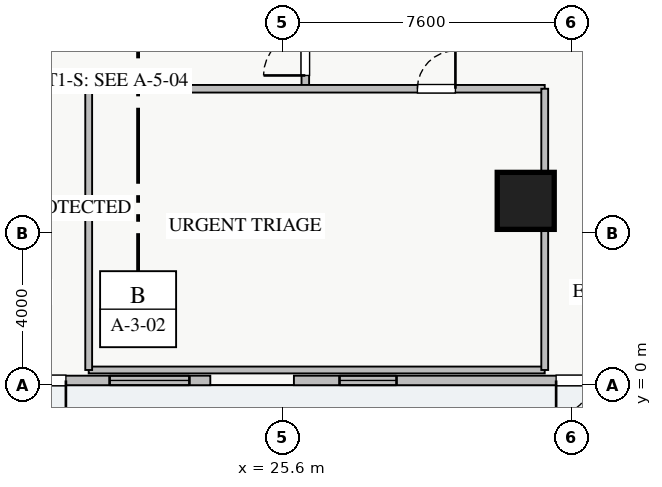
"""IFC4 building model, lengths in metres.
Left out: names, types, materials, properties, quantities, classifications, styles, units other than length and angle.
Written with IfcOpenShell. Run it as: python <this file> out.ifc"""

import sys

from ifc_helpers import new_model, si_unit, direction, frame, frame_2d, origin, origin_2d, place, context, subcontext, project, spatial, rectangle, extrude, source, transform, mapped, element, fill, save


model = new_model("IFC4")
c1 = context("Model", 3, precision=1e-05, world=origin(), true_north=direction((0.0, 1.0)))
c2 = subcontext(c1, "Body", "Model", "MODEL_VIEW")
j1 = project(units=[si_unit("LENGTHUNIT", "METRE"), si_unit("PLANEANGLEUNIT", "RADIAN")], contexts=[c1])
p1 = place(None, origin())
s1 = spatial("IfcSite", under=j1, at=p1, CompositionType="ELEMENT")
p2 = place(p1, origin())
s2 = spatial("IfcBuilding", under=s1, at=p2, CompositionType="ELEMENT")
p3 = place(p2, origin())
s3 = spatial("IfcBuildingStorey", under=s2, at=p3, CompositionType="ELEMENT", Elevation=0.0)
m1 = source(origin(), c2, "Body", "SweptSolid", [
    extrude(rectangle(XDim=1.5, YDim=1.5, at=origin_2d()), origin(), (0.0, 0.0, 1.0), 5.0),
])
p4 = place(p3, frame((32.0, 4.85, 0.0), z_axis=(0.0, 0.0, 1.0), x_axis=(1.0, 0.0, 0.0)))
e1 = element("IfcColumn", 1, at=p4, inside=s3, PredefinedType="COLUMN", context=c2, shape_type="MappedRepresentation", body=[
    mapped(m1, transform((0.0, 0.0, 0.0), x_axis=(1.0, 0.0, 0.0), y_axis=(0.0, 1.0, 0.0), z_axis=(0.0, 0.0, 1.0), scale=1.0)),
])
p5 = place(p3, frame((14.3, 0.125, 0.0), z_axis=(0.0, 0.0, 1.0), x_axis=(1.0, 0.0, 0.0)))
e2 = element("IfcWall", 2, at=p5, inside=s3, PredefinedType="STANDARD", context=c2, shape_type="SweptSolid", body=[
    extrude(rectangle(XDim=9.4, YDim=0.25, at=frame_2d((4.7, 0.0))), origin(), (0.0, 0.0, 1.0), 4.32),
])
p6 = place(p5, frame((3.8, 0.0, 0.0)))
e3 = element("IfcOpeningElement", 3, at=p6, cuts=e2, PredefinedType="OPENING", context=c2, shape_type="SweptSolid", body=[
    extrude(rectangle(XDim=1.8, YDim=2.2, at=frame_2d((0.9, 1.1))), frame((0.0, 0.135, 0.0), z_axis=(0.0, -1.0, 0.0), x_axis=(1.0, 0.0, 0.0)), (0.0, 0.0, 1.0), 0.27),
])
p7 = place(p5, frame((1.6, 0.0, 0.9)))
e4 = element("IfcOpeningElement", 4, at=p7, cuts=e2, PredefinedType="OPENING", context=c2, shape_type="SweptSolid", body=[
    extrude(rectangle(XDim=1.5, YDim=1.45, at=frame_2d((0.75, 0.725))), frame((0.0, 0.135, 0.0), z_axis=(0.0, -1.0, 0.0), x_axis=(1.0, 0.0, 0.0)), (0.0, 0.0, 1.0), 0.27),
])
p8 = place(p5, frame((6.75, 0.0, 0.9)))
e5 = element("IfcOpeningElement", 5, at=p8, cuts=e2, PredefinedType="OPENING", context=c2, shape_type="SweptSolid", body=[
    extrude(rectangle(XDim=2.1, YDim=1.5, at=frame_2d((1.05, 0.75))), frame((0.0, 0.135, 0.0), z_axis=(0.0, -1.0, 0.0), x_axis=(1.0, 0.0, 0.0)), (0.0, 0.0, 1.0), 0.27),
])
p9 = place(p3, frame((25.9, 0.125, 0.0), z_axis=(0.0, 0.0, 1.0), x_axis=(1.0, 0.0, 0.0)))
e6 = element("IfcWall", 6, at=p9, inside=s3, PredefinedType="STANDARD", context=c2, shape_type="SweptSolid", body=[
    extrude(rectangle(XDim=15.6, YDim=0.25, at=frame_2d((7.8, 0.0))), origin(), (0.0, 0.0, 1.0), 4.32),
])
p10 = place(p9, frame((6.9, 0.0, 0.0)))
e7 = element("IfcOpeningElement", 7, at=p10, cuts=e6, PredefinedType="OPENING", context=c2, shape_type="SweptSolid", body=[
    extrude(rectangle(XDim=1.8, YDim=2.2, at=frame_2d((0.9, 1.1))), frame((0.0, 0.135, 0.0), z_axis=(0.0, -1.0, 0.0), x_axis=(1.0, 0.0, 0.0)), (0.0, 0.0, 1.0), 0.27),
])
p11 = place(p9, frame((1.2, 0.0, 0.9)))
e8 = element("IfcOpeningElement", 8, at=p11, cuts=e6, PredefinedType="OPENING", context=c2, shape_type="SweptSolid", body=[
    extrude(rectangle(XDim=1.5, YDim=1.45, at=frame_2d((0.75, 0.725))), frame((0.0, 0.135, 0.0), z_axis=(0.0, -1.0, 0.0), x_axis=(1.0, 0.0, 0.0)), (0.0, 0.0, 1.0), 0.27),
])
p12 = place(p9, frame((12.75, 0.0, 0.9)))
e9 = element("IfcOpeningElement", 9, at=p12, cuts=e6, PredefinedType="OPENING", context=c2, shape_type="SweptSolid", body=[
    extrude(rectangle(XDim=1.8, YDim=1.45, at=frame_2d((0.9, 0.725))), frame((0.0, 0.135, 0.0), z_axis=(0.0, -1.0, 0.0), x_axis=(1.0, 0.0, 0.0)), (0.0, 0.0, 1.0), 0.27),
])
p13 = place(p3, frame((26.2, 7.8, 0.0), z_axis=(0.0, 0.0, 1.0), x_axis=(0.0, 1.0, 0.0)))
e10 = element("IfcWall", 10, at=p13, inside=s3, PredefinedType="PARTITIONING", context=c2, shape_type="SweptSolid", body=[
    extrude(rectangle(XDim=2.0, YDim=0.2, at=frame_2d((1.0, 0.0))), origin(), (0.0, 0.0, 1.0), 4.78),
])
p14 = place(p13, frame((0.35, 0.0, 0.0)))
e11 = element("IfcOpeningElement", 11, at=p14, cuts=e10, PredefinedType="OPENING", context=c2, shape_type="SweptSolid", body=[
    extrude(rectangle(XDim=1.1, YDim=2.05, at=frame_2d((0.55, 1.025))), frame((0.0, 0.11, 0.0), z_axis=(0.0, -1.0, 0.0), x_axis=(1.0, 0.0, 0.0)), (0.0, 0.0, 1.0), 0.22),
])
p15 = place(p3, frame((20.5, 7.8, 0.0), z_axis=(0.0, 0.0, 1.0), x_axis=(1.0, 0.0, 0.0)))
e12 = element("IfcWall", 12, at=p15, inside=s3, PredefinedType="PARTITIONING", context=c2, shape_type="SweptSolid", body=[
    extrude(rectangle(XDim=12.0, YDim=0.2, at=frame_2d((6.0, 0.0))), origin(), (0.0, 0.0, 1.0), 4.78),
])
p16 = place(p15, frame((8.65, 0.0, 0.0)))
e13 = element("IfcOpeningElement", 13, at=p16, cuts=e12, PredefinedType="OPENING", context=c2, shape_type="SweptSolid", body=[
    extrude(rectangle(XDim=1.0, YDim=2.05, at=frame_2d((0.5, 1.025))), frame((0.0, 0.11, 0.0), z_axis=(0.0, -1.0, 0.0), x_axis=(1.0, 0.0, 0.0)), (0.0, 0.0, 1.0), 0.22),
])
p17 = place(p3, frame((20.5, 0.4, 0.0), z_axis=(0.0, 0.0, 1.0), x_axis=(1.0, 0.0, 0.0)))
e14 = element("IfcWall", 14, at=p17, inside=s3, PredefinedType="PARTITIONING", context=c2, shape_type="SweptSolid", body=[
    extrude(rectangle(XDim=12.0, YDim=0.18, at=frame_2d((6.0, 0.0))), origin(), (0.0, 0.0, 1.0), 4.78),
])
for number, where, z_axis, x_axis in (
    (15, (20.5, 0.4, 0.0), (0.0, 0.0, 1.0), (0.0, 1.0, 0.0)),
    (16, (32.5, 0.4, 0.0), (0.0, 0.0, 1.0), (0.0, 1.0, 0.0)),
):
    element("IfcWall", number, at=place(p3, frame(where, z_axis=z_axis, x_axis=x_axis)), inside=s3, PredefinedType="PARTITIONING", context=c2, shape_type="SweptSolid", body=[
        extrude(rectangle(XDim=7.4, YDim=0.18, at=frame_2d((3.7, 0.0))), origin(), (0.0, 0.0, 1.0), 4.78),
    ])
m2 = source(origin(), c2, "Body", "SweptSolid", [
    extrude(rectangle(XDim=1.8, YDim=2.2, at=frame_2d((0.9, 1.1))), frame((0.0, 0.025, 0.0), z_axis=(0.0, -1.0, 0.0), x_axis=(1.0, 0.0, 0.0)), (0.0, 0.0, 1.0), 0.05),
])
p18 = place(p6, frame((1.8, 0.0, 0.0), z_axis=(0.0, 0.0, 1.0), x_axis=(-1.0, 0.0, 0.0)))
e17 = element("IfcDoor", 17, at=p18, inside=s3, OperationType="DOUBLE_DOOR_SINGLE_SWING", PredefinedType="DOOR", context=c2, shape_type="MappedRepresentation", body=[
    mapped(m2, transform((0.0, 0.0, 0.0), x_axis=(1.0, 0.0, 0.0), y_axis=(0.0, 1.0, 0.0), z_axis=(0.0, 0.0, 1.0), scale=1.0)),
])
fill(e3, e17)
m3 = source(origin(), c2, "Body", "SweptSolid", [
    extrude(rectangle(XDim=2.1, YDim=1.5, at=frame_2d((1.05, 0.75))), frame((0.0, 0.03, 0.0), z_axis=(0.0, -1.0, 0.0), x_axis=(1.0, 0.0, 0.0)), (0.0, 0.0, 1.0), 0.06),
])
p19 = place(p8, origin())
e18 = element("IfcWindow", 18, at=p19, inside=s3, PartitioningType="TRIPLE_PANEL_VERTICAL", PredefinedType="WINDOW", context=c2, shape_type="MappedRepresentation", body=[
    mapped(m3, transform((0.0, 0.0, 0.0), x_axis=(1.0, 0.0, 0.0), y_axis=(0.0, 1.0, 0.0), z_axis=(0.0, 0.0, 1.0), scale=1.0)),
])
fill(e5, e18)
p20 = place(p10, frame((1.8, 0.0, 0.0), z_axis=(0.0, 0.0, 1.0), x_axis=(-1.0, 0.0, 0.0)))
e19 = element("IfcDoor", 19, at=p20, inside=s3, OperationType="DOUBLE_DOOR_SINGLE_SWING", PredefinedType="DOOR", context=c2, shape_type="MappedRepresentation", body=[
    mapped(m2, transform((0.0, 0.0, 0.0), x_axis=(1.0, 0.0, 0.0), y_axis=(0.0, 1.0, 0.0), z_axis=(0.0, 0.0, 1.0), scale=1.0)),
])
fill(e7, e19)
m4 = source(origin(), c2, "Body", "SweptSolid", [
    extrude(rectangle(XDim=1.5, YDim=1.45, at=frame_2d((0.75, 0.725))), frame((0.0, 0.03, 0.0), z_axis=(0.0, -1.0, 0.0), x_axis=(1.0, 0.0, 0.0)), (0.0, 0.0, 1.0), 0.06),
])
p21 = place(p11, origin())
e20 = element("IfcWindow", 20, at=p21, inside=s3, PartitioningType="DOUBLE_PANEL_VERTICAL", PredefinedType="WINDOW", context=c2, shape_type="MappedRepresentation", body=[
    mapped(m4, transform((0.0, 0.0, 0.0), x_axis=(1.0, 0.0, 0.0), y_axis=(0.0, 1.0, 0.0), z_axis=(0.0, 0.0, 1.0), scale=1.0)),
])
fill(e8, e20)
m5 = source(origin(), c2, "Body", "SweptSolid", [
    extrude(rectangle(XDim=1.1, YDim=2.05, at=frame_2d((0.55, 1.025))), frame((0.0, 0.025, 0.0), z_axis=(0.0, -1.0, 0.0), x_axis=(1.0, 0.0, 0.0)), (0.0, 0.0, 1.0), 0.05),
])
p22 = place(p14, origin())
e21 = element("IfcDoor", 21, at=p22, inside=s3, OperationType="SINGLE_SWING_LEFT", PredefinedType="DOOR", context=c2, shape_type="MappedRepresentation", body=[
    mapped(m5, transform((0.0, 0.0, 0.0), x_axis=(1.0, 0.0, 0.0), y_axis=(0.0, 1.0, 0.0), z_axis=(0.0, 0.0, 1.0), scale=1.0)),
])
fill(e11, e21)
m6 = source(origin(), c2, "Body", "SweptSolid", [
    extrude(rectangle(XDim=1.0, YDim=2.05, at=frame_2d((0.5, 1.025))), frame((0.0, 0.025, 0.0), z_axis=(0.0, -1.0, 0.0), x_axis=(1.0, 0.0, 0.0)), (0.0, 0.0, 1.0), 0.05),
])
p23 = place(p16, origin())
e22 = element("IfcDoor", 22, at=p23, inside=s3, OperationType="SINGLE_SWING_RIGHT", PredefinedType="DOOR", context=c2, shape_type="MappedRepresentation", body=[
    mapped(m6, transform((0.0, 0.0, 0.0), x_axis=(1.0, 0.0, 0.0), y_axis=(0.0, 1.0, 0.0), z_axis=(0.0, 0.0, 1.0), scale=1.0)),
])
fill(e13, e22)
save(model, sys.argv[1])
